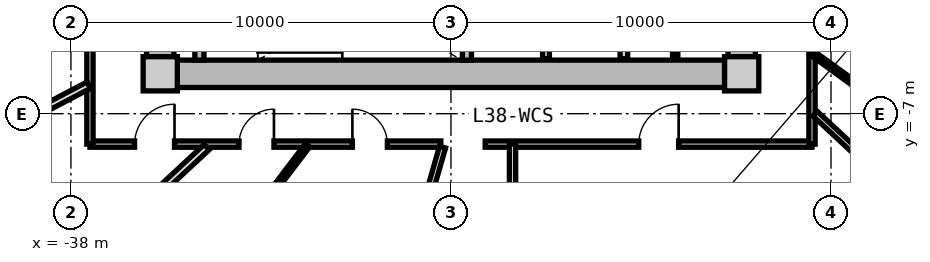
"""IFC4 building model, lengths in metres.
Left out: names, types, materials, properties, quantities, classifications, styles, units other than length and angle.
Written with IfcOpenShell. Run it as: python <this file> out.ifc"""

import sys

from ifc_helpers import new_model, si_unit, direction, frame, frame_2d, origin, origin_2d, place, context, subcontext, project, spatial, rectangle, extrude, source, transform, mapped, element, fill, save


model = new_model("IFC4")
c1 = context("Model", 3, precision=1e-05, world=origin(), true_north=direction((0.0, 1.0)))
c2 = subcontext(c1, "Body", "Model", "MODEL_VIEW")
j1 = project(units=[si_unit("LENGTHUNIT", "METRE"), si_unit("PLANEANGLEUNIT", "RADIAN")], contexts=[c1])
p1 = place(None, origin())
s1 = spatial("IfcSite", under=j1, at=p1, CompositionType="ELEMENT")
p2 = place(p1, origin())
s2 = spatial("IfcBuilding", under=s1, at=p2, CompositionType="ELEMENT")
p3 = place(p2, frame((0.0, 0.0, 123.7)))
s3 = spatial("IfcBuildingStorey", under=s2, at=p3, CompositionType="ELEMENT", Elevation=123.7)
m1 = source(origin(), c2, "Body", "SweptSolid", [
    extrude(rectangle(XDim=0.9, YDim=0.9, at=origin_2d()), origin(), (0.0, 0.0, 1.0), 3.05),
])
for number, where, z_axis, x_axis in (
    (1, (-35.65, -5.95, 0.0), (0.0, 0.0, 1.0), (1.0, 0.0, 0.0)),
    (2, (-20.35, -5.95, 0.0), (0.0, 0.0, 1.0), (1.0, 0.0, 0.0)),
):
    element("IfcColumn", number, at=place(p3, frame(where, z_axis=z_axis, x_axis=x_axis)), inside=s3, PredefinedType="COLUMN", context=c2, shape_type="MappedRepresentation", body=[
        mapped(m1, transform((0.0, 0.0, 0.0), x_axis=(1.0, 0.0, 0.0), y_axis=(0.0, 1.0, 0.0), z_axis=(0.0, 0.0, 1.0), scale=1.0)),
    ])
m2 = source(origin(), c2, "Body", "SweptSolid", [
    extrude(rectangle(XDim=14.4, YDim=0.72, at=frame_2d((7.2, 0.0))), origin(), (0.0, 0.0, 1.0), 2.79),
])
p4 = place(p3, frame((-20.8, -5.95, 0.0), z_axis=(0.0, 0.0, 1.0), x_axis=(-1.0, 0.0, 0.0)))
e3 = element("IfcWall", 3, at=p4, inside=s3, PredefinedType="SHEAR", context=c2, shape_type="MappedRepresentation", body=[
    mapped(m2, transform((0.0, 0.0, 0.0), x_axis=(1.0, 0.0, 0.0), y_axis=(0.0, 1.0, 0.0), z_axis=(0.0, 0.0, 1.0), scale=1.0)),
])
m3 = source(origin(), c2, "Body", "SweptSolid", [
    extrude(rectangle(XDim=11.0, YDim=0.72, at=frame_2d((5.5, 0.0))), origin(), (0.0, 0.0, 1.0), 2.79),
])
p5 = place(p3, frame((-35.65, -5.5, 0.0), z_axis=(0.0, 0.0, 1.0), x_axis=(0.0, 1.0, 0.0)))
e4 = element("IfcWall", 4, at=p5, inside=s3, PredefinedType="SHEAR", context=c2, shape_type="MappedRepresentation", body=[
    mapped(m3, transform((0.0, 0.0, 0.0), x_axis=(1.0, 0.0, 0.0), y_axis=(0.0, 1.0, 0.0), z_axis=(0.0, 0.0, 1.0), scale=1.0)),
])
p6 = place(p5, frame((3.8, 0.0, 0.0)))
e5 = element("IfcOpeningElement", 5, at=p6, cuts=e4, PredefinedType="OPENING", context=c2, shape_type="SweptSolid", body=[
    extrude(rectangle(XDim=1.2, YDim=2.15, at=frame_2d((0.6, 1.075))), frame((0.0, 0.37, 0.0), z_axis=(0.0, -1.0, 0.0), x_axis=(1.0, 0.0, 0.0)), (0.0, 0.0, 1.0), 0.74),
])
p7 = place(p3, frame((-20.35, 5.5, 0.0), z_axis=(0.0, 0.0, 1.0), x_axis=(0.0, -1.0, 0.0)))
e6 = element("IfcWall", 6, at=p7, inside=s3, PredefinedType="SHEAR", context=c2, shape_type="MappedRepresentation", body=[
    mapped(m3, transform((0.0, 0.0, 0.0), x_axis=(1.0, 0.0, 0.0), y_axis=(0.0, 1.0, 0.0), z_axis=(0.0, 0.0, 1.0), scale=1.0)),
])
p8 = place(p7, frame((5.65, 0.0, 0.0)))
e7 = element("IfcOpeningElement", 7, at=p8, cuts=e6, PredefinedType="OPENING", context=c2, shape_type="SweptSolid", body=[
    extrude(rectangle(XDim=1.2, YDim=2.15, at=frame_2d((0.6, 1.075))), frame((0.0, 0.37, 0.0), z_axis=(0.0, -1.0, 0.0), x_axis=(1.0, 0.0, 0.0)), (0.0, 0.0, 1.0), 0.74),
])
m4 = source(origin(), c2, "Body", "SweptSolid", [
    extrude(rectangle(XDim=3.14, YDim=0.24, at=frame_2d((1.57, 0.0))), origin(), (0.0, 0.0, 1.0), 2.79),
])
for number, where, z_axis, x_axis in (
    (8, (-34.62, -5.59, 0.0), (0.0, 0.0, 1.0), (0.0, 1.0, 0.0)),
    (9, (-27.58, -5.59, 0.0), (0.0, 0.0, 1.0), (0.0, 1.0, 0.0)),
):
    element("IfcWall", number, at=place(p3, frame(where, z_axis=z_axis, x_axis=x_axis)), inside=s3, PredefinedType="PARTITIONING", context=c2, shape_type="MappedRepresentation", body=[
        mapped(m4, transform((0.0, 0.0, 0.0), x_axis=(1.0, 0.0, 0.0), y_axis=(0.0, 1.0, 0.0), z_axis=(0.0, 0.0, 1.0), scale=1.0)),
    ])
m5 = source(origin(), c2, "Body", "SweptSolid", [
    extrude(rectangle(XDim=3.8, YDim=0.2, at=frame_2d((1.9, 0.0))), origin(), (0.0, 0.0, 1.0), 2.775),
])
p9 = place(p3, frame((-23.45, -5.55, 0.0), z_axis=(0.0, 0.0, 1.0), x_axis=(0.0, 1.0, 0.0)))
e10 = element("IfcWall", 10, at=p9, inside=s3, PredefinedType="PARTITIONING", context=c2, shape_type="MappedRepresentation", body=[
    mapped(m5, transform((0.0, 0.0, 0.0), x_axis=(1.0, 0.0, 0.0), y_axis=(0.0, 1.0, 0.0), z_axis=(0.0, 0.0, 1.0), scale=1.0)),
])
m6 = source(origin(), c2, "Body", "SweptSolid", [
    extrude(rectangle(XDim=3.22, YDim=0.18, at=frame_2d((1.61, 0.0))), origin(), (0.0, 0.0, 1.0), 2.775),
])
p10 = place(p3, frame((-25.5, -5.55, 0.0), z_axis=(0.0, 0.0, 1.0), x_axis=(0.0, 1.0, 0.0)))
e11 = element("IfcWall", 11, at=p10, inside=s3, PredefinedType="PARTITIONING", context=c2, shape_type="MappedRepresentation", body=[
    mapped(m6, transform((0.0, 0.0, 0.0), x_axis=(1.0, 0.0, 0.0), y_axis=(0.0, 1.0, 0.0), z_axis=(0.0, 0.0, 1.0), scale=1.0)),
])
m7 = source(origin(), c2, "Body", "SweptSolid", [
    extrude(rectangle(XDim=3.8, YDim=0.14, at=frame_2d((1.9, 0.0))), origin(), (0.0, 0.0, 1.0), 2.775),
])
p11 = place(p3, frame((-22.1, -5.55, 0.0), z_axis=(0.0, 0.0, 1.0), x_axis=(0.0, 1.0, 0.0)))
e12 = element("IfcWall", 12, at=p11, inside=s3, PredefinedType="PARTITIONING", context=c2, shape_type="MappedRepresentation", body=[
    mapped(m7, transform((0.0, 0.0, 0.0), x_axis=(1.0, 0.0, 0.0), y_axis=(0.0, 1.0, 0.0), z_axis=(0.0, 0.0, 1.0), scale=1.0)),
])
m8 = source(origin(), c2, "Body", "SweptSolid", [
    extrude(rectangle(XDim=8.6, YDim=0.165, at=frame_2d((4.3, 0.0))), origin(), (0.0, 0.0, 1.0), 2.775),
])
p12 = place(p3, frame((-18.5, -7.8, 0.0), z_axis=(0.0, 0.0, 1.0), x_axis=(-1.0, 0.0, 0.0)))
e13 = element("IfcWall", 13, at=p12, inside=s3, PredefinedType="PARTITIONING", context=c2, shape_type="MappedRepresentation", body=[
    mapped(m8, transform((0.0, 0.0, 0.0), x_axis=(1.0, 0.0, 0.0), y_axis=(0.0, 1.0, 0.0), z_axis=(0.0, 0.0, 1.0), scale=1.0)),
])
p13 = place(p12, frame((3.509, 0.0, 0.0)))
e14 = element("IfcOpeningElement", 14, at=p13, cuts=e13, PredefinedType="OPENING", context=c2, shape_type="SweptSolid", body=[
    extrude(rectangle(XDim=1.05, YDim=2.15, at=frame_2d((0.525, 1.075))), frame((0.0, 0.093, 0.0), z_axis=(0.0, -1.0, 0.0), x_axis=(1.0, 0.0, 0.0)), (0.0, 0.0, 1.0), 0.185),
])
m9 = source(origin(), c2, "Body", "SweptSolid", [
    extrude(rectangle(XDim=9.234, YDim=0.165, at=frame_2d((4.617, 0.0))), origin(), (0.0, 0.0, 1.0), 2.775),
])
p14 = place(p3, frame((-28.266, -7.8, 0.0), z_axis=(0.0, 0.0, 1.0), x_axis=(-1.0, 0.0, 0.0)))
e15 = element("IfcWall", 15, at=p14, inside=s3, PredefinedType="PARTITIONING", context=c2, shape_type="MappedRepresentation", body=[
    mapped(m9, transform((0.0, 0.0, 0.0), x_axis=(1.0, 0.0, 0.0), y_axis=(0.0, 1.0, 0.0), z_axis=(0.0, 0.0, 1.0), scale=1.0)),
])
p15 = place(p14, frame((7.009, 0.0, 0.0)))
e16 = element("IfcOpeningElement", 16, at=p15, cuts=e15, PredefinedType="OPENING", context=c2, shape_type="SweptSolid", body=[
    extrude(rectangle(XDim=1.05, YDim=2.15, at=frame_2d((0.525, 1.075))), frame((0.0, 0.093, 0.0), z_axis=(0.0, -1.0, 0.0), x_axis=(1.0, 0.0, 0.0)), (0.0, 0.0, 1.0), 0.185),
])
p16 = place(p14, frame((4.392, 0.0, 0.0)))
e17 = element("IfcOpeningElement", 17, at=p16, cuts=e15, PredefinedType="OPENING", context=c2, shape_type="SweptSolid", body=[
    extrude(rectangle(XDim=0.92, YDim=2.1, at=frame_2d((0.46, 1.05))), frame((0.0, 0.093, 0.0), z_axis=(0.0, -1.0, 0.0), x_axis=(1.0, 0.0, 0.0)), (0.0, 0.0, 1.0), 0.185),
])
p17 = place(p14, frame((1.408, 0.0, 0.0)))
e18 = element("IfcOpeningElement", 18, at=p17, cuts=e15, PredefinedType="OPENING", context=c2, shape_type="SweptSolid", body=[
    extrude(rectangle(XDim=0.92, YDim=2.1, at=frame_2d((0.46, 1.05))), frame((0.0, 0.093, 0.0), z_axis=(0.0, -1.0, 0.0), x_axis=(1.0, 0.0, 0.0)), (0.0, 0.0, 1.0), 0.185),
])
m10 = source(origin(), c2, "Body", "SweptSolid", [
    extrude(rectangle(XDim=15.6, YDim=0.165, at=frame_2d((7.8, 0.0))), origin(), (0.0, 0.0, 1.0), 2.775),
])
p18 = place(p3, frame((-37.5, -7.8, 0.0), z_axis=(0.0, 0.0, 1.0), x_axis=(0.0, 1.0, 0.0)))
e19 = element("IfcWall", 19, at=p18, inside=s3, PredefinedType="PARTITIONING", context=c2, shape_type="MappedRepresentation", body=[
    mapped(m10, transform((0.0, 0.0, 0.0), x_axis=(1.0, 0.0, 0.0), y_axis=(0.0, 1.0, 0.0), z_axis=(0.0, 0.0, 1.0), scale=1.0)),
])
p19 = place(p18, frame((11.994, 0.0, 0.0)))
e20 = element("IfcOpeningElement", 20, at=p19, cuts=e19, PredefinedType="OPENING", context=c2, shape_type="SweptSolid", body=[
    extrude(rectangle(XDim=1.25, YDim=2.2, at=frame_2d((0.625, 1.1))), frame((0.0, 0.093, 0.0), z_axis=(0.0, -1.0, 0.0), x_axis=(1.0, 0.0, 0.0)), (0.0, 0.0, 1.0), 0.185),
])
p20 = place(p18, frame((7.984, 0.0, 0.0)))
e21 = element("IfcOpeningElement", 21, at=p20, cuts=e19, PredefinedType="OPENING", context=c2, shape_type="SweptSolid", body=[
    extrude(rectangle(XDim=1.05, YDim=2.15, at=frame_2d((0.525, 1.075))), frame((0.0, 0.093, 0.0), z_axis=(0.0, -1.0, 0.0), x_axis=(1.0, 0.0, 0.0)), (0.0, 0.0, 1.0), 0.185),
])
p21 = place(p18, frame((5.777, 0.0, 0.0)))
e22 = element("IfcOpeningElement", 22, at=p21, cuts=e19, PredefinedType="OPENING", context=c2, shape_type="SweptSolid", body=[
    extrude(rectangle(XDim=1.05, YDim=2.15, at=frame_2d((0.525, 1.075))), frame((0.0, 0.093, 0.0), z_axis=(0.0, -1.0, 0.0), x_axis=(1.0, 0.0, 0.0)), (0.0, 0.0, 1.0), 0.185),
])
p22 = place(p18, frame((2.676, 0.0, 0.0)))
e23 = element("IfcOpeningElement", 23, at=p22, cuts=e19, PredefinedType="OPENING", context=c2, shape_type="SweptSolid", body=[
    extrude(rectangle(XDim=1.05, YDim=2.15, at=frame_2d((0.525, 1.075))), frame((0.0, 0.093, 0.0), z_axis=(0.0, -1.0, 0.0), x_axis=(1.0, 0.0, 0.0)), (0.0, 0.0, 1.0), 0.185),
])
p23 = place(p3, frame((-18.5, 7.8, 0.0), z_axis=(0.0, 0.0, 1.0), x_axis=(0.0, -1.0, 0.0)))
e24 = element("IfcWall", 24, at=p23, inside=s3, PredefinedType="PARTITIONING", context=c2, shape_type="MappedRepresentation", body=[
    mapped(m10, transform((0.0, 0.0, 0.0), x_axis=(1.0, 0.0, 0.0), y_axis=(0.0, 1.0, 0.0), z_axis=(0.0, 0.0, 1.0), scale=1.0)),
])
p24 = place(p23, frame((12.002, 0.0, 0.0)))
e25 = element("IfcOpeningElement", 25, at=p24, cuts=e24, PredefinedType="OPENING", context=c2, shape_type="SweptSolid", body=[
    extrude(rectangle(XDim=1.05, YDim=2.15, at=frame_2d((0.525, 1.075))), frame((0.0, 0.093, 0.0), z_axis=(0.0, -1.0, 0.0), x_axis=(1.0, 0.0, 0.0)), (0.0, 0.0, 1.0), 0.185),
])
p25 = place(p23, frame((10.211, 0.0, 0.0)))
e26 = element("IfcOpeningElement", 26, at=p25, cuts=e24, PredefinedType="OPENING", context=c2, shape_type="SweptSolid", body=[
    extrude(rectangle(XDim=1.05, YDim=2.15, at=frame_2d((0.525, 1.075))), frame((0.0, 0.093, 0.0), z_axis=(0.0, -1.0, 0.0), x_axis=(1.0, 0.0, 0.0)), (0.0, 0.0, 1.0), 0.185),
])
p26 = place(p23, frame((7.722, 0.0, 0.0)))
e27 = element("IfcOpeningElement", 27, at=p26, cuts=e24, PredefinedType="OPENING", context=c2, shape_type="SweptSolid", body=[
    extrude(rectangle(XDim=1.05, YDim=2.15, at=frame_2d((0.525, 1.075))), frame((0.0, 0.093, 0.0), z_axis=(0.0, -1.0, 0.0), x_axis=(1.0, 0.0, 0.0)), (0.0, 0.0, 1.0), 0.185),
])
p27 = place(p23, frame((6.291, 0.0, 0.0)))
e28 = element("IfcOpeningElement", 28, at=p27, cuts=e24, PredefinedType="OPENING", context=c2, shape_type="SweptSolid", body=[
    extrude(rectangle(XDim=1.05, YDim=2.15, at=frame_2d((0.525, 1.075))), frame((0.0, 0.093, 0.0), z_axis=(0.0, -1.0, 0.0), x_axis=(1.0, 0.0, 0.0)), (0.0, 0.0, 1.0), 0.185),
])
p28 = place(p23, frame((4.296, 0.0, 0.0)))
e29 = element("IfcOpeningElement", 29, at=p28, cuts=e24, PredefinedType="OPENING", context=c2, shape_type="SweptSolid", body=[
    extrude(rectangle(XDim=1.05, YDim=2.15, at=frame_2d((0.525, 1.075))), frame((0.0, 0.093, 0.0), z_axis=(0.0, -1.0, 0.0), x_axis=(1.0, 0.0, 0.0)), (0.0, 0.0, 1.0), 0.185),
])
p29 = place(p23, frame((1.654, 0.0, 0.0)))
e30 = element("IfcOpeningElement", 30, at=p29, cuts=e24, PredefinedType="OPENING", context=c2, shape_type="SweptSolid", body=[
    extrude(rectangle(XDim=1.05, YDim=2.15, at=frame_2d((0.525, 1.075))), frame((0.0, 0.093, 0.0), z_axis=(0.0, -1.0, 0.0), x_axis=(1.0, 0.0, 0.0)), (0.0, 0.0, 1.0), 0.185),
])
m11 = source(origin(), c2, "Body", "SweptSolid", [
    extrude(rectangle(XDim=8.989, YDim=0.165, at=frame_2d((4.495, 0.0))), origin(), (0.0, 0.0, 1.0), 2.275),
])
p30 = place(p3, frame((-28.222, -7.88, 0.0), z_axis=(0.0, 0.0, 1.0), x_axis=(-0.27702323008, -0.960863221274, 0.0)))
e31 = element("IfcWall", 31, at=p30, inside=s3, PredefinedType="PARTITIONING", context=c2, shape_type="MappedRepresentation", body=[
    mapped(m11, transform((0.0, 0.0, 0.0), x_axis=(1.0, 0.0, 0.0), y_axis=(0.0, 1.0, 0.0), z_axis=(0.0, 0.0, 1.0), scale=1.0)),
])
m12 = source(origin(), c2, "Body", "SweptSolid", [
    extrude(rectangle(XDim=7.482, YDim=0.165, at=frame_2d((3.741, 0.0))), origin(), (0.0, 0.0, 1.0), 2.275),
])
p31 = place(p3, frame((-18.42, -6.998, 0.0), z_axis=(0.0, 0.0, 1.0), x_axis=(0.732508698043, -0.680757671489, 0.0)))
e32 = element("IfcWall", 32, at=p31, inside=s3, PredefinedType="PARTITIONING", context=c2, shape_type="MappedRepresentation", body=[
    mapped(m12, transform((0.0, 0.0, 0.0), x_axis=(1.0, 0.0, 0.0), y_axis=(0.0, 1.0, 0.0), z_axis=(0.0, 0.0, 1.0), scale=1.0)),
])
m13 = source(origin(), c2, "Body", "SweptSolid", [
    extrude(rectangle(XDim=6.99, YDim=0.165, at=frame_2d((3.495, 0.0))), origin(), (0.0, 0.0, 1.0), 2.775),
])
p32 = place(p3, frame((-26.38, -14.79, 0.0), z_axis=(0.0, 0.0, 1.0), x_axis=(0.0, 1.0, 0.0)))
e33 = element("IfcWall", 33, at=p32, inside=s3, PredefinedType="PARTITIONING", context=c2, shape_type="MappedRepresentation", body=[
    mapped(m13, transform((0.0, 0.0, 0.0), x_axis=(1.0, 0.0, 0.0), y_axis=(0.0, 1.0, 0.0), z_axis=(0.0, 0.0, 1.0), scale=1.0)),
])
m14 = source(origin(), c2, "Body", "SweptSolid", [
    extrude(rectangle(XDim=6.187, YDim=0.19, at=frame_2d((3.093, 0.0))), origin(), (0.0, 0.0, 1.0), 2.275),
])
p33 = place(p3, frame((-34.429, -7.88, 0.0), z_axis=(0.0, 0.0, 1.0), x_axis=(-0.732501077882, -0.680765870841, 0.0)))
e34 = element("IfcWall", 34, at=p33, inside=s3, PredefinedType="PARTITIONING", context=c2, shape_type="MappedRepresentation", body=[
    mapped(m14, transform((0.0, 0.0, 0.0), x_axis=(1.0, 0.0, 0.0), y_axis=(0.0, 1.0, 0.0), z_axis=(0.0, 0.0, 1.0), scale=1.0)),
])
m15 = source(origin(), c2, "Body", "SweptSolid", [
    extrude(rectangle(XDim=4.31, YDim=0.19, at=frame_2d((2.155, 0.0))), origin(), (0.0, 0.0, 1.0), 2.775),
])
p34 = place(p3, frame((-37.53, -6.248, 0.0), z_axis=(0.0, 0.0, 1.0), x_axis=(-0.884459441503, -0.466617076773, 0.0)))
e35 = element("IfcWall", 35, at=p34, inside=s3, PredefinedType="PARTITIONING", context=c2, shape_type="MappedRepresentation", body=[
    mapped(m15, transform((0.0, 0.0, 0.0), x_axis=(1.0, 0.0, 0.0), y_axis=(0.0, 1.0, 0.0), z_axis=(0.0, 0.0, 1.0), scale=1.0)),
])
m16 = source(origin(), c2, "Body", "SweptSolid", [
    extrude(rectangle(XDim=7.243, YDim=0.14, at=frame_2d((3.621, 0.0))), origin(), (0.0, 0.0, 1.0), 2.775),
])
p35 = place(p3, frame((-31.774, -7.83, 0.0), z_axis=(0.0, 0.0, 1.0), x_axis=(-0.605111472002, -0.796140757939, 0.0)))
e36 = element("IfcWall", 36, at=p35, inside=s3, PredefinedType="PARTITIONING", context=c2, shape_type="MappedRepresentation", body=[
    mapped(m16, transform((0.0, 0.0, 0.0), x_axis=(1.0, 0.0, 0.0), y_axis=(0.0, 1.0, 0.0), z_axis=(0.0, 0.0, 1.0), scale=1.0)),
])
m17 = source(origin(), c2, "Body", "SweptSolid", [
    extrude(rectangle(XDim=8.744, YDim=0.19, at=frame_2d((4.372, 0.0))), origin(), (0.0, 0.0, 1.0), 2.775),
])
p36 = place(p3, frame((-18.273, -4.142, 0.0), z_axis=(0.0, 0.0, 1.0), x_axis=(0.882252449936, -0.470776607938, 0.0)))
e37 = element("IfcWall", 37, at=p36, inside=s3, PredefinedType="PARTITIONING", context=c2, shape_type="MappedRepresentation", body=[
    mapped(m17, transform((0.0, 0.0, 0.0), x_axis=(1.0, 0.0, 0.0), y_axis=(0.0, 1.0, 0.0), z_axis=(0.0, 0.0, 1.0), scale=1.0)),
])
m18 = source(origin(), c2, "Body", "SweptSolid", [
    extrude(rectangle(XDim=3.621, YDim=0.14, at=frame_2d((1.811, 0.0))), origin(), (0.0, 0.0, 1.0), 2.775),
])
p37 = place(p3, frame((-18.47, -5.422, 0.0), z_axis=(0.0, 0.0, 1.0), x_axis=(0.80968252222, -0.586868139544, 0.0)))
e38 = element("IfcWall", 38, at=p37, inside=s3, PredefinedType="PARTITIONING", context=c2, shape_type="MappedRepresentation", body=[
    mapped(m18, transform((0.0, 0.0, 0.0), x_axis=(1.0, 0.0, 0.0), y_axis=(0.0, 1.0, 0.0), z_axis=(0.0, 0.0, 1.0), scale=1.0)),
])
p38 = place(p37, frame((1.351, 0.0, 0.0)))
e39 = element("IfcOpeningElement", 39, at=p38, cuts=e38, PredefinedType="OPENING", context=c2, shape_type="SweptSolid", body=[
    extrude(rectangle(XDim=0.92, YDim=2.1, at=frame_2d((0.46, 1.05))), frame((0.0, 0.08, 0.0), z_axis=(0.0, -1.0, 0.0), x_axis=(1.0, 0.0, 0.0)), (0.0, 0.0, 1.0), 0.16),
])
m19 = source(origin(), c2, "Body", "SweptSolid", [
    extrude(rectangle(XDim=1.05, YDim=2.15, at=frame_2d((0.525, 1.075))), frame((0.0, 0.025, 0.0), z_axis=(0.0, -1.0, 0.0), x_axis=(1.0, 0.0, 0.0)), (0.0, 0.0, 1.0), 0.05),
])
p39 = place(p13, frame((1.05, 0.0, 0.0), z_axis=(0.0, 0.0, 1.0), x_axis=(-1.0, 0.0, 0.0)))
e40 = element("IfcDoor", 40, at=p39, inside=s3, OperationType="SINGLE_SWING_RIGHT", PredefinedType="DOOR", context=c2, shape_type="MappedRepresentation", body=[
    mapped(m19, transform((0.0, 0.0, 0.0), x_axis=(1.0, 0.0, 0.0), y_axis=(0.0, 1.0, 0.0), z_axis=(0.0, 0.0, 1.0), scale=1.0)),
])
fill(e14, e40)
p40 = place(p15, frame((1.05, 0.0, 0.0), z_axis=(0.0, 0.0, 1.0), x_axis=(-1.0, 0.0, 0.0)))
e41 = element("IfcDoor", 41, at=p40, inside=s3, OperationType="SINGLE_SWING_RIGHT", PredefinedType="DOOR", context=c2, shape_type="MappedRepresentation", body=[
    mapped(m19, transform((0.0, 0.0, 0.0), x_axis=(1.0, 0.0, 0.0), y_axis=(0.0, 1.0, 0.0), z_axis=(0.0, 0.0, 1.0), scale=1.0)),
])
fill(e16, e41)
m20 = source(origin(), c2, "Body", "SweptSolid", [
    extrude(rectangle(XDim=0.92, YDim=2.1, at=frame_2d((0.46, 1.05))), frame((0.0, 0.025, 0.0), z_axis=(0.0, -1.0, 0.0), x_axis=(1.0, 0.0, 0.0)), (0.0, 0.0, 1.0), 0.05),
])
p41 = place(p16, frame((0.92, 0.0, 0.0), z_axis=(0.0, 0.0, 1.0), x_axis=(-1.0, 0.0, 0.0)))
e42 = element("IfcDoor", 42, at=p41, inside=s3, OperationType="SINGLE_SWING_RIGHT", PredefinedType="DOOR", context=c2, shape_type="MappedRepresentation", body=[
    mapped(m20, transform((0.0, 0.0, 0.0), x_axis=(1.0, 0.0, 0.0), y_axis=(0.0, 1.0, 0.0), z_axis=(0.0, 0.0, 1.0), scale=1.0)),
])
fill(e17, e42)
p42 = place(p17, frame((0.92, 0.0, 0.0), z_axis=(0.0, 0.0, 1.0), x_axis=(-1.0, 0.0, 0.0)))
e43 = element("IfcDoor", 43, at=p42, inside=s3, OperationType="SINGLE_SWING_LEFT", PredefinedType="DOOR", context=c2, shape_type="MappedRepresentation", body=[
    mapped(m20, transform((0.0, 0.0, 0.0), x_axis=(1.0, 0.0, 0.0), y_axis=(0.0, 1.0, 0.0), z_axis=(0.0, 0.0, 1.0), scale=1.0)),
])
fill(e18, e43)
save(model, sys.argv[1])
